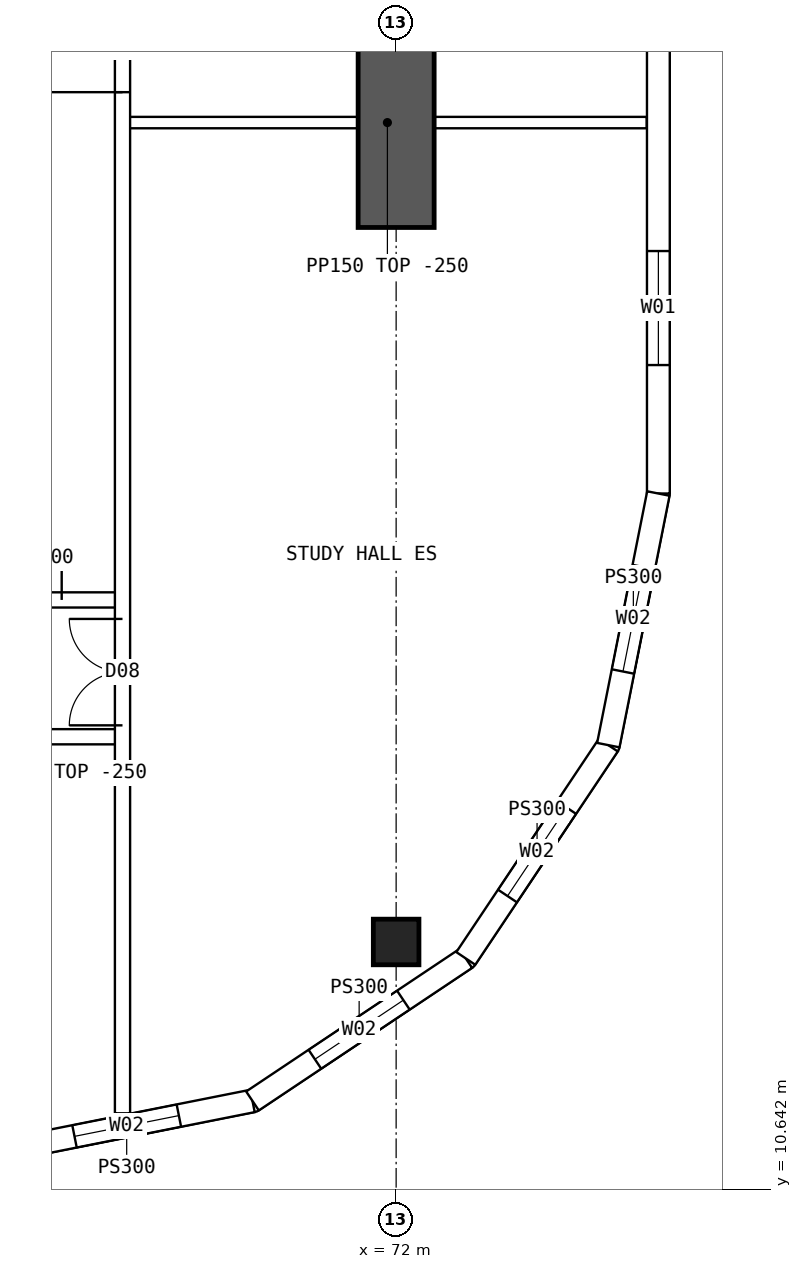
"""IFC4 building model, lengths in metres.
Left out: names, types, materials, properties, quantities, classifications, styles, units other than length and angle.
Written with IfcOpenShell. Run it as: python <this file> out.ifc"""

import sys

from ifc_helpers import new_model, si_unit, direction, frame, frame_2d, origin, origin_2d, place, context, subcontext, project, spatial, polyline, rectangle, hollow_rectangle, outline, extrude, element, fill, save


model = new_model("IFC4")
c1 = context("Model", 3, precision=1e-05, world=origin(), true_north=direction((0.0, 1.0)))
c2 = subcontext(c1, "Body", "Model", "MODEL_VIEW")
j1 = project(units=[si_unit("LENGTHUNIT", "METRE"), si_unit("PLANEANGLEUNIT", "RADIAN")], contexts=[c1])
p1 = place(None, origin())
s1 = spatial("IfcSite", under=j1, at=p1, CompositionType="ELEMENT")
p2 = place(p1, origin())
s2 = spatial("IfcBuilding", under=s1, at=p2, CompositionType="ELEMENT")
p3 = place(p2, frame((0.0, 0.0, 224.05)))
s3 = spatial("IfcBuildingStorey", under=s2, at=p3, CompositionType="ELEMENT", Elevation=224.05)
p4 = place(p3, frame((72.0, 13.9, 0.0), z_axis=(0.0, 0.0, 1.0), x_axis=(1.0, 0.0, 0.0)))
e1 = element("IfcColumn", 1, at=p4, inside=s3, PredefinedType="COLUMN", context=c2, shape_type="SweptSolid", body=[
    extrude(hollow_rectangle(XDim=0.6, YDim=0.6, WallThickness=0.06, at=origin_2d()), origin(), (0.0, 0.0, 1.0), 3.75),
])
p5 = place(p3, frame((72.0, 23.3, 0.0), z_axis=(0.0, 0.0, 1.0), x_axis=(0.0, 1.0, 0.0)))
e2 = element("IfcWall", 2, at=p5, inside=s3, PredefinedType="SHEAR", context=c2, shape_type="SweptSolid", body=[
    extrude(rectangle(XDim=5.0, YDim=1.0, at=frame_2d((2.5, 0.0))), origin(), (0.0, 0.0, 1.0), 3.75),
])
p6 = place(p3, frame((75.45, 19.8, 0.0), z_axis=(0.0, 0.0, 1.0), x_axis=(0.0, 1.0, 0.0)))
e3 = element("IfcWall", 3, at=p6, inside=s3, PredefinedType="SOLIDWALL", context=c2, shape_type="SweptSolid", body=[
    extrude(outline(polyline([(-0.015, -0.15), (24.415, -0.15), (24.385, 0.15), (0.015, 0.15), (-0.015, -0.15)])), origin(), (0.0, 0.0, 1.0), 3.5),
])
p7 = place(p6, frame((1.69, 0.0, 0.9)))
e4 = element("IfcOpeningElement", 4, at=p7, cuts=e3, PredefinedType="OPENING", context=c2, shape_type="SweptSolid", body=[
    extrude(rectangle(XDim=1.5, YDim=2.0, at=frame_2d((0.75, 1.0))), frame((0.0, 0.16, 0.0), z_axis=(0.0, -1.0, 0.0), x_axis=(1.0, 0.0, 0.0)), (0.0, 0.0, 1.0), 0.32),
])
p8 = place(p6, frame((6.57, 0.0, 0.9)))
e5 = element("IfcOpeningElement", 5, at=p8, cuts=e3, PredefinedType="OPENING", context=c2, shape_type="SweptSolid", body=[
    extrude(rectangle(XDim=1.5, YDim=2.0, at=frame_2d((0.75, 1.0))), frame((0.0, 0.16, 0.0), z_axis=(0.0, -1.0, 0.0), x_axis=(1.0, 0.0, 0.0)), (0.0, 0.0, 1.0), 0.32),
])
p9 = place(p6, frame((11.45, 0.0, 0.9)))
e6 = element("IfcOpeningElement", 6, at=p9, cuts=e3, PredefinedType="OPENING", context=c2, shape_type="SweptSolid", body=[
    extrude(rectangle(XDim=1.5, YDim=2.0, at=frame_2d((0.75, 1.0))), frame((0.0, 0.16, 0.0), z_axis=(0.0, -1.0, 0.0), x_axis=(1.0, 0.0, 0.0)), (0.0, 0.0, 1.0), 0.32),
])
p10 = place(p6, frame((16.33, 0.0, 0.9)))
e7 = element("IfcOpeningElement", 7, at=p10, cuts=e3, PredefinedType="OPENING", context=c2, shape_type="SweptSolid", body=[
    extrude(rectangle(XDim=1.5, YDim=2.0, at=frame_2d((0.75, 1.0))), frame((0.0, 0.16, 0.0), z_axis=(0.0, -1.0, 0.0), x_axis=(1.0, 0.0, 0.0)), (0.0, 0.0, 1.0), 0.32),
])
p11 = place(p6, frame((21.21, 0.0, 0.9)))
e8 = element("IfcOpeningElement", 8, at=p11, cuts=e3, PredefinedType="OPENING", context=c2, shape_type="SweptSolid", body=[
    extrude(rectangle(XDim=1.5, YDim=2.0, at=frame_2d((0.75, 1.0))), frame((0.0, 0.16, 0.0), z_axis=(0.0, -1.0, 0.0), x_axis=(1.0, 0.0, 0.0)), (0.0, 0.0, 1.0), 0.32),
])
p12 = place(p3, frame((66.8, 11.15, 0.0), z_axis=(0.0, 0.0, 1.0), x_axis=(0.98078325777, 0.195100490205, 0.0)))
e9 = element("IfcWall", 9, at=p12, inside=s3, PredefinedType="SOLIDWALL", context=c2, shape_type="SweptSolid", body=[
    extrude(outline(polyline([(-0.03, -0.15), (3.405, -0.15), (3.345, 0.15), (0.03, 0.15), (-0.03, -0.15)])), origin(), (0.0, 0.0, 1.0), 3.5),
])
p13 = place(p12, frame((0.988, 0.0, 0.9)))
e10 = element("IfcOpeningElement", 10, at=p13, cuts=e9, PredefinedType="OPENING", context=c2, shape_type="SweptSolid", body=[
    extrude(rectangle(XDim=1.4, YDim=1.8, at=frame_2d((0.7, 0.9))), frame((0.0, 0.16, 0.0), z_axis=(0.0, -1.0, 0.0), x_axis=(1.0, 0.0, 0.0)), (0.0, 0.0, 1.0), 0.32),
])
p14 = place(p3, frame((70.11, 11.808, 0.0), z_axis=(0.0, 0.0, 1.0), x_axis=(0.831460037396, 0.555584562613, 0.0)))
e11 = element("IfcWall", 11, at=p14, inside=s3, PredefinedType="SOLIDWALL", context=c2, shape_type="SweptSolid", body=[
    extrude(outline(polyline([(-0.03, -0.15), (3.405, -0.15), (3.345, 0.15), (0.03, 0.15), (-0.03, -0.15)])), origin(), (0.0, 0.0, 1.0), 3.5),
])
p15 = place(p14, frame((0.988, 0.0, 0.9)))
e12 = element("IfcOpeningElement", 12, at=p15, cuts=e11, PredefinedType="OPENING", context=c2, shape_type="SweptSolid", body=[
    extrude(rectangle(XDim=1.4, YDim=1.8, at=frame_2d((0.7, 0.9))), frame((0.0, 0.16, 0.0), z_axis=(0.0, -1.0, 0.0), x_axis=(1.0, 0.0, 0.0)), (0.0, 0.0, 1.0), 0.32),
])
p16 = place(p3, frame((72.917, 13.684, 0.0), z_axis=(0.0, 0.0, 1.0), x_axis=(0.555567969291, 0.831471124873, 0.0)))
e13 = element("IfcWall", 13, at=p16, inside=s3, PredefinedType="SOLIDWALL", context=c2, shape_type="SweptSolid", body=[
    extrude(outline(polyline([(-0.03, -0.15), (3.405, -0.15), (3.345, 0.15), (0.03, 0.15), (-0.03, -0.15)])), origin(), (0.0, 0.0, 1.0), 3.5),
])
p17 = place(p16, frame((0.988, 0.0, 0.9)))
e14 = element("IfcOpeningElement", 14, at=p17, cuts=e13, PredefinedType="OPENING", context=c2, shape_type="SweptSolid", body=[
    extrude(rectangle(XDim=1.4, YDim=1.8, at=frame_2d((0.7, 0.9))), frame((0.0, 0.16, 0.0), z_axis=(0.0, -1.0, 0.0), x_axis=(1.0, 0.0, 0.0)), (0.0, 0.0, 1.0), 0.32),
])
p18 = place(p3, frame((74.792, 16.49, 0.0), z_axis=(0.0, 0.0, 1.0), x_axis=(0.19508664885, 0.980786011034, 0.0)))
e15 = element("IfcWall", 15, at=p18, inside=s3, PredefinedType="SOLIDWALL", context=c2, shape_type="SweptSolid", body=[
    extrude(outline(polyline([(-0.03, -0.15), (3.39, -0.15), (3.36, 0.15), (0.03, 0.15), (-0.03, -0.15)])), origin(), (0.0, 0.0, 1.0), 3.5),
])
p19 = place(p18, frame((0.988, 0.0, 0.9)))
e16 = element("IfcOpeningElement", 16, at=p19, cuts=e15, PredefinedType="OPENING", context=c2, shape_type="SweptSolid", body=[
    extrude(rectangle(XDim=1.4, YDim=1.8, at=frame_2d((0.7, 0.9))), frame((0.0, 0.16, 0.0), z_axis=(0.0, -1.0, 0.0), x_axis=(1.0, 0.0, 0.0)), (0.0, 0.0, 1.0), 0.32),
])
p20 = place(p3, frame((66.35, 16.6, 0.0), z_axis=(0.0, 0.0, 1.0), x_axis=(1.0, 0.0, 0.0)))
e17 = element("IfcWall", 17, at=p20, inside=s3, PredefinedType="SOLIDWALL", context=c2, shape_type="SweptSolid", body=[
    extrude(rectangle(XDim=2.05, YDim=0.2, at=frame_2d((1.025, 0.0))), origin(), (0.0, 0.0, 1.0), 3.5),
])
p21 = place(p20, frame((0.2, 0.0, 0.0)))
e18 = element("IfcOpeningElement", 18, at=p21, cuts=e17, PredefinedType="OPENING", context=c2, shape_type="SweptSolid", body=[
    extrude(rectangle(XDim=0.9, YDim=2.1, at=frame_2d((0.45, 1.05))), frame((0.0, 0.11, 0.0), z_axis=(0.0, -1.0, 0.0), x_axis=(1.0, 0.0, 0.0)), (0.0, 0.0, 1.0), 0.22),
])
p22 = place(p3, frame((66.35, 18.4, 0.0), z_axis=(0.0, 0.0, 1.0), x_axis=(1.0, 0.0, 0.0)))
e19 = element("IfcWall", 19, at=p22, inside=s3, PredefinedType="SOLIDWALL", context=c2, shape_type="SweptSolid", body=[
    extrude(rectangle(XDim=2.05, YDim=0.2, at=frame_2d((1.025, 0.0))), origin(), (0.0, 0.0, 1.0), 3.5),
])
p23 = place(p22, frame((0.05, 0.0, 0.0)))
e20 = element("IfcOpeningElement", 20, at=p23, cuts=e19, PredefinedType="OPENING", context=c2, shape_type="SweptSolid", body=[
    extrude(rectangle(XDim=1.2, YDim=2.1, at=frame_2d((0.6, 1.05))), frame((0.0, 0.11, 0.0), z_axis=(0.0, -1.0, 0.0), x_axis=(1.0, 0.0, 0.0)), (0.0, 0.0, 1.0), 0.22),
])
p24 = place(p3, frame((68.4, 11.646, 0.0), z_axis=(0.0, 0.0, 1.0), x_axis=(0.0, 1.0, 0.0)))
e21 = element("IfcWall", 21, at=p24, inside=s3, PredefinedType="SOLIDWALL", context=c2, shape_type="SweptSolid", body=[
    extrude(rectangle(XDim=40.708, YDim=0.2, at=frame_2d((20.354, 0.0))), origin(), (0.0, 0.0, 1.0), 3.5),
])
p25 = place(p24, frame((13.434, 0.0, 0.0)))
e22 = element("IfcOpeningElement", 22, at=p25, cuts=e21, PredefinedType="OPENING", context=c2, shape_type="SweptSolid", body=[
    extrude(rectangle(XDim=1.2, YDim=2.1, at=frame_2d((0.6, 1.05))), frame((0.0, 0.11, 0.0), z_axis=(0.0, -1.0, 0.0), x_axis=(1.0, 0.0, 0.0)), (0.0, 0.0, 1.0), 0.22),
])
p26 = place(p24, frame((21.194, 0.0, 0.0)))
e23 = element("IfcOpeningElement", 23, at=p26, cuts=e21, PredefinedType="OPENING", context=c2, shape_type="SweptSolid", body=[
    extrude(rectangle(XDim=1.2, YDim=2.1, at=frame_2d((0.6, 1.05))), frame((0.0, 0.11, 0.0), z_axis=(0.0, -1.0, 0.0), x_axis=(1.0, 0.0, 0.0)), (0.0, 0.0, 1.0), 0.22),
])
p27 = place(p24, frame((5.104, 0.0, 0.0)))
e24 = element("IfcOpeningElement", 24, at=p27, cuts=e21, PredefinedType="OPENING", context=c2, shape_type="SweptSolid", body=[
    extrude(rectangle(XDim=1.4, YDim=2.1, at=frame_2d((0.7, 1.05))), frame((0.0, 0.11, 0.0), z_axis=(0.0, -1.0, 0.0), x_axis=(1.0, 0.0, 0.0)), (0.0, 0.0, 1.0), 0.22),
])
p28 = place(p24, frame((34.104, 0.0, 0.0)))
e25 = element("IfcOpeningElement", 25, at=p28, cuts=e21, PredefinedType="OPENING", context=c2, shape_type="SweptSolid", body=[
    extrude(rectangle(XDim=1.4, YDim=2.1, at=frame_2d((0.7, 1.05))), frame((0.0, 0.11, 0.0), z_axis=(0.0, -1.0, 0.0), x_axis=(1.0, 0.0, 0.0)), (0.0, 0.0, 1.0), 0.22),
])
p29 = place(p3, frame((68.475, 24.68, 0.0), z_axis=(0.0, 0.0, 1.0), x_axis=(1.0, 0.0, 0.0)))
e26 = element("IfcWall", 26, at=p29, inside=s3, PredefinedType="PARTITIONING", context=c2, shape_type="SweptSolid", body=[
    extrude(rectangle(XDim=6.82, YDim=0.15, at=frame_2d((3.41, 0.0))), origin(), (0.0, 0.0, 1.0), 3.5),
])
p30 = place(p7, origin())
e27 = element("IfcWindow", 27, at=p30, inside=s3, PartitioningType="SINGLE_PANEL", PredefinedType="WINDOW", context=c2, shape_type="SweptSolid", body=[
    extrude(rectangle(XDim=1.5, YDim=2.0, at=frame_2d((0.75, 1.0))), frame((0.0, 0.03, 0.0), z_axis=(0.0, -1.0, 0.0), x_axis=(1.0, 0.0, 0.0)), (0.0, 0.0, 1.0), 0.06),
])
fill(e4, e27)
p31 = place(p13, origin())
e28 = element("IfcWindow", 28, at=p31, inside=s3, PartitioningType="SINGLE_PANEL", PredefinedType="WINDOW", context=c2, shape_type="SweptSolid", body=[
    extrude(rectangle(XDim=1.4, YDim=1.8, at=frame_2d((0.7, 0.9))), frame((0.0, 0.03, 0.0), z_axis=(0.0, -1.0, 0.0), x_axis=(1.0, 0.0, 0.0)), (0.0, 0.0, 1.0), 0.06),
])
fill(e10, e28)
p32 = place(p15, origin())
e29 = element("IfcWindow", 29, at=p32, inside=s3, PartitioningType="SINGLE_PANEL", PredefinedType="WINDOW", context=c2, shape_type="SweptSolid", body=[
    extrude(rectangle(XDim=1.4, YDim=1.8, at=frame_2d((0.7, 0.9))), frame((0.0, 0.03, 0.0), z_axis=(0.0, -1.0, 0.0), x_axis=(1.0, 0.0, 0.0)), (0.0, 0.0, 1.0), 0.06),
])
fill(e12, e29)
p33 = place(p17, origin())
e30 = element("IfcWindow", 30, at=p33, inside=s3, PartitioningType="SINGLE_PANEL", PredefinedType="WINDOW", context=c2, shape_type="SweptSolid", body=[
    extrude(rectangle(XDim=1.4, YDim=1.8, at=frame_2d((0.7, 0.9))), frame((0.0, 0.03, 0.0), z_axis=(0.0, -1.0, 0.0), x_axis=(1.0, 0.0, 0.0)), (0.0, 0.0, 1.0), 0.06),
])
fill(e14, e30)
p34 = place(p19, origin())
e31 = element("IfcWindow", 31, at=p34, inside=s3, PartitioningType="SINGLE_PANEL", PredefinedType="WINDOW", context=c2, shape_type="SweptSolid", body=[
    extrude(rectangle(XDim=1.4, YDim=1.8, at=frame_2d((0.7, 0.9))), frame((0.0, 0.03, 0.0), z_axis=(0.0, -1.0, 0.0), x_axis=(1.0, 0.0, 0.0)), (0.0, 0.0, 1.0), 0.06),
])
fill(e16, e31)
p35 = place(p23, origin())
e32 = element("IfcDoor", 32, at=p35, inside=s3, OperationType="DOUBLE_DOOR_SINGLE_SWING", PredefinedType="DOOR", context=c2, shape_type="SweptSolid", body=[
    extrude(rectangle(XDim=1.2, YDim=2.1, at=frame_2d((0.6, 1.05))), frame((0.0, 0.025, 0.0), z_axis=(0.0, -1.0, 0.0), x_axis=(1.0, 0.0, 0.0)), (0.0, 0.0, 1.0), 0.05),
])
fill(e20, e32)
p36 = place(p25, origin())
e33 = element("IfcDoor", 33, at=p36, inside=s3, OperationType="SINGLE_SWING_LEFT", PredefinedType="DOOR", context=c2, shape_type="SweptSolid", body=[
    extrude(rectangle(XDim=1.2, YDim=2.1, at=frame_2d((0.6, 1.05))), frame((0.0, 0.025, 0.0), z_axis=(0.0, -1.0, 0.0), x_axis=(1.0, 0.0, 0.0)), (0.0, 0.0, 1.0), 0.05),
])
fill(e22, e33)
p37 = place(p27, origin())
e34 = element("IfcDoor", 34, at=p37, inside=s3, OperationType="DOUBLE_DOOR_SINGLE_SWING", PredefinedType="DOOR", context=c2, shape_type="SweptSolid", body=[
    extrude(rectangle(XDim=1.4, YDim=2.1, at=frame_2d((0.7, 1.05))), frame((0.0, 0.025, 0.0), z_axis=(0.0, -1.0, 0.0), x_axis=(1.0, 0.0, 0.0)), (0.0, 0.0, 1.0), 0.05),
])
fill(e24, e34)
save(model, sys.argv[1])
